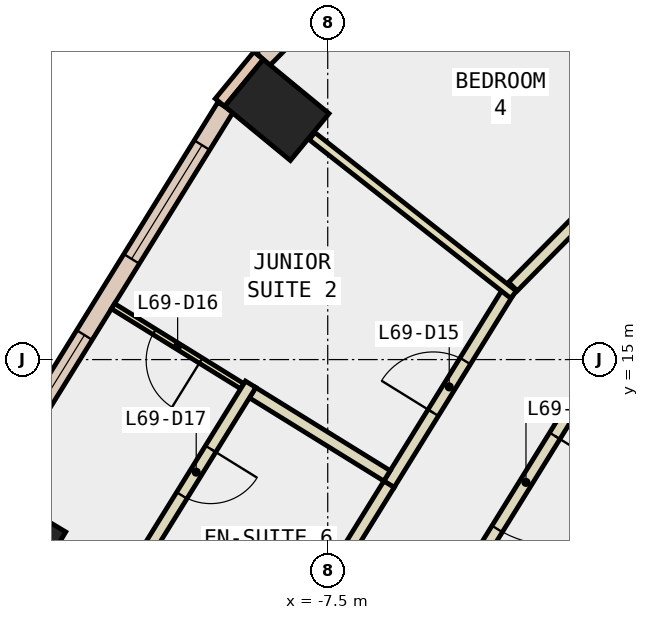
"""IFC4 building model, lengths in metres.
Left out: names, types, materials, properties, quantities, classifications, styles, units other than length and angle.
Written with IfcOpenShell. Run it as: python <this file> out.ifc"""

import sys

from ifc_helpers import new_model, si_unit, direction, frame, frame_2d, origin, origin_2d, place, context, subcontext, project, spatial, rectangle, extrude, element, fill, save


model = new_model("IFC4")
c1 = context("Model", 3, precision=1e-05, world=origin(), true_north=direction((0.0, 1.0)))
c2 = subcontext(c1, "Body", "Model", "MODEL_VIEW")
j1 = project(units=[si_unit("LENGTHUNIT", "METRE"), si_unit("PLANEANGLEUNIT", "RADIAN")], contexts=[c1])
p1 = place(None, origin())
s1 = spatial("IfcSite", under=j1, at=p1, CompositionType="ELEMENT")
p2 = place(p1, origin())
s2 = spatial("IfcBuilding", under=s1, at=p2, CompositionType="ELEMENT")
p3 = place(p2, frame((0.0, 0.0, 297.2)))
s3 = spatial("IfcBuildingStorey", under=s2, at=p3, CompositionType="ELEMENT", Elevation=297.2)
for number, where, z_axis, x_axis in (
    (1, (-8.337, 19.105, -0.34), (0.0, 0.0, 1.0), (0.636, 0.772, 0.0)),
    (2, (-12.666, 12.097, -0.34), (0.0, 0.0, 1.0), (0.514, 0.858, 0.0)),
):
    element("IfcColumn", number, at=place(p3, frame(where, z_axis=z_axis, x_axis=x_axis)), inside=s3, PredefinedType="COLUMN", context=c2, shape_type="SweptSolid", body=[
        extrude(rectangle(XDim=1.0, YDim=1.4, at=origin_2d()), origin(), (0.0, 0.0, 1.0), 3.6),
    ])
p4 = place(p3, frame((-8.637, 19.999, 0.0), z_axis=(0.0, 0.0, 1.0), x_axis=(-0.635852688617, -0.771810441999, 0.0)))
e3 = element("IfcWall", 3, at=p4, inside=s3, PredefinedType="STANDARD", context=c2, shape_type="SweptSolid", body=[
    extrude(rectangle(XDim=1.0, YDim=0.2, at=frame_2d((0.5, 0.0))), origin(), (0.0, 0.0, 1.0), 3.26),
])
p5 = place(p3, frame((-5.572, 22.969, 0.0), z_axis=(0.0, 0.0, 1.0), x_axis=(-0.70250598769, -0.711677832491, 0.0)))
e4 = element("IfcWall", 4, at=p5, inside=s3, PredefinedType="STANDARD", context=c2, shape_type="SweptSolid", body=[
    extrude(rectangle(XDim=4.259, YDim=0.3, at=frame_2d((2.129, 0.0))), origin(), (0.0, 0.0, 1.0), 3.26),
])
p6 = place(p5, frame((1.429, 0.0, 0.9)))
e5 = element("IfcOpeningElement", 5, at=p6, cuts=e4, PredefinedType="OPENING", context=c2, shape_type="SweptSolid", body=[
    extrude(rectangle(XDim=1.4, YDim=2.0, at=frame_2d((0.7, 1.0))), frame((0.0, 0.16, 0.0), z_axis=(0.0, -1.0, 0.0), x_axis=(1.0, 0.0, 0.0)), (0.0, 0.0, 1.0), 0.32),
])
p7 = place(p3, frame((-9.18, 19.153, 0.0), z_axis=(0.0, 0.0, 1.0), x_axis=(-0.526409529565, -0.850231149267, 0.0)))
e6 = element("IfcWall", 6, at=p7, inside=s3, PredefinedType="STANDARD", context=c2, shape_type="SweptSolid", body=[
    extrude(rectangle(XDim=7.346, YDim=0.3, at=frame_2d((3.673, 0.0))), origin(), (0.0, 0.0, 1.0), 3.26),
])
p8 = place(p7, frame((0.737, 0.0, 0.9)))
e7 = element("IfcOpeningElement", 7, at=p8, cuts=e6, PredefinedType="OPENING", context=c2, shape_type="SweptSolid", body=[
    extrude(rectangle(XDim=2.2, YDim=2.0, at=frame_2d((1.1, 1.0))), frame((0.0, 0.16, 0.0), z_axis=(0.0, -1.0, 0.0), x_axis=(1.0, 0.0, 0.0)), (0.0, 0.0, 1.0), 0.32),
])
p9 = place(p7, frame((4.41, 0.0, 0.9)))
e8 = element("IfcOpeningElement", 8, at=p9, cuts=e6, PredefinedType="OPENING", context=c2, shape_type="SweptSolid", body=[
    extrude(rectangle(XDim=2.2, YDim=2.0, at=frame_2d((1.1, 1.0))), frame((0.0, 0.16, 0.0), z_axis=(0.0, -1.0, 0.0), x_axis=(1.0, 0.0, 0.0)), (0.0, 0.0, 1.0), 0.32),
])
p10 = place(p3, frame((-2.969, 15.033, 0.0), z_axis=(0.0, 0.0, 1.0), x_axis=(-0.526330241425, -0.85028023437, 0.0)))
e9 = element("IfcWall", 9, at=p10, inside=s3, PredefinedType="PARTITIONING", context=c2, shape_type="SweptSolid", body=[
    extrude(rectangle(XDim=4.828, YDim=0.2, at=frame_2d((2.414, 0.0))), origin(), (0.0, 0.0, 1.0), 3.26),
])
p11 = place(p10, frame((1.514, 0.0, 0.0)))
e10 = element("IfcOpeningElement", 10, at=p11, cuts=e9, PredefinedType="OPENING", context=c2, shape_type="SweptSolid", body=[
    extrude(rectangle(XDim=1.8, YDim=2.1, at=frame_2d((0.9, 1.05))), frame((0.0, 0.11, 0.0), z_axis=(0.0, -1.0, 0.0), x_axis=(1.0, 0.0, 0.0)), (0.0, 0.0, 1.0), 0.22),
])
p12 = place(p3, frame((-4.454, 16.201, 0.0), z_axis=(0.0, 0.0, 1.0), x_axis=(0.702505657511, 0.711678158415, 0.0)))
e11 = element("IfcWall", 11, at=p12, inside=s3, PredefinedType="PARTITIONING", context=c2, shape_type="SweptSolid", body=[
    extrude(rectangle(XDim=3.167, YDim=0.2, at=frame_2d((1.584, 0.0))), origin(), (0.0, 0.0, 1.0), 3.26),
])
p13 = place(p3, frame((-6.493, 12.95, 0.0), z_axis=(0.0, 0.0, 1.0), x_axis=(0.526432748426, 0.850216773173, 0.0)))
e12 = element("IfcWall", 12, at=p13, inside=s3, PredefinedType="PARTITIONING", context=c2, shape_type="SweptSolid", body=[
    extrude(rectangle(XDim=3.765, YDim=0.2, at=frame_2d((1.882, 0.0))), origin(), (0.0, 0.0, 1.0), 3.26),
])
p14 = place(p13, frame((1.383, 0.0, 0.0)))
e13 = element("IfcOpeningElement", 13, at=p14, cuts=e12, PredefinedType="OPENING", context=c2, shape_type="SweptSolid", body=[
    extrude(rectangle(XDim=1.0, YDim=2.1, at=frame_2d((0.5, 1.05))), frame((0.0, 0.11, 0.0), z_axis=(0.0, -1.0, 0.0), x_axis=(1.0, 0.0, 0.0)), (0.0, 0.0, 1.0), 0.22),
])
p15 = place(p3, frame((-8.177, 10.229, 0.0), z_axis=(0.0, 0.0, 1.0), x_axis=(0.526504295939, 0.850172468595, 0.0)))
e14 = element("IfcWall", 14, at=p15, inside=s3, PredefinedType="PARTITIONING", context=c2, shape_type="SweptSolid", body=[
    extrude(rectangle(XDim=3.2, YDim=0.2, at=frame_2d((1.6, 0.0))), origin(), (0.0, 0.0, 1.0), 3.26),
])
p16 = place(p3, frame((-4.445, 16.068, 0.0), z_axis=(0.0, 0.0, 1.0), x_axis=(-0.785872006963, 0.618389188677, 0.0)))
e15 = element("IfcWall", 15, at=p16, inside=s3, PredefinedType="PARTITIONING", context=c2, shape_type="SweptSolid", body=[
    extrude(rectangle(XDim=4.216, YDim=0.15, at=frame_2d((2.108, 0.0))), origin(), (0.0, 0.0, 1.0), 3.26),
])
p17 = place(p3, frame((-8.906, 14.562, 0.0), z_axis=(0.0, 0.0, 1.0), x_axis=(-0.850186034224, 0.526482390219, 0.0)))
e16 = element("IfcWall", 16, at=p17, inside=s3, PredefinedType="PARTITIONING", context=c2, shape_type="SweptSolid", body=[
    extrude(rectangle(XDim=2.5, YDim=0.1, at=frame_2d((1.25, 0.0))), origin(), (0.0, 0.0, 1.0), 3.26),
])
p18 = place(p17, frame((0.8, 0.0, 0.0)))
e17 = element("IfcOpeningElement", 17, at=p18, cuts=e16, PredefinedType="OPENING", context=c2, shape_type="SweptSolid", body=[
    extrude(rectangle(XDim=0.9, YDim=2.1, at=frame_2d((0.45, 1.05))), frame((0.0, 0.06, 0.0), z_axis=(0.0, -1.0, 0.0), x_axis=(1.0, 0.0, 0.0)), (0.0, 0.0, 1.0), 0.12),
])
p19 = place(p3, frame((-6.525, 13.088, 0.0), z_axis=(0.0, 0.0, 1.0), x_axis=(-0.850379182329, 0.526170358592, 0.0)))
e18 = element("IfcWall", 18, at=p19, inside=s3, PredefinedType="PARTITIONING", context=c2, shape_type="SweptSolid", body=[
    extrude(rectangle(XDim=2.6, YDim=0.2, at=frame_2d((1.3, 0.0))), origin(), (0.0, 0.0, 1.0), 3.26),
])
p20 = place(p3, frame((-8.768, 14.594, 0.0), z_axis=(0.0, 0.0, 1.0), x_axis=(-0.526418877713, -0.850225361412, 0.0)))
e19 = element("IfcWall", 19, at=p20, inside=s3, PredefinedType="PARTITIONING", context=c2, shape_type="SweptSolid", body=[
    extrude(rectangle(XDim=3.4, YDim=0.2, at=frame_2d((1.7, 0.0))), origin(), (0.0, 0.0, 1.0), 3.26),
])
p21 = place(p20, frame((1.25, 0.0, 0.0)))
e20 = element("IfcOpeningElement", 20, at=p21, cuts=e19, PredefinedType="OPENING", context=c2, shape_type="SweptSolid", body=[
    extrude(rectangle(XDim=0.9, YDim=2.1, at=frame_2d((0.45, 1.05))), frame((0.0, 0.11, 0.0), z_axis=(0.0, -1.0, 0.0), x_axis=(1.0, 0.0, 0.0)), (0.0, 0.0, 1.0), 0.22),
])
p22 = place(p8, origin())
e21 = element("IfcWindow", 21, at=p22, inside=s3, PartitioningType="SINGLE_PANEL", PredefinedType="WINDOW", context=c2, shape_type="SweptSolid", body=[
    extrude(rectangle(XDim=2.2, YDim=2.0, at=frame_2d((1.1, 1.0))), frame((0.0, 0.03, 0.0), z_axis=(0.0, -1.0, 0.0), x_axis=(1.0, 0.0, 0.0)), (0.0, 0.0, 1.0), 0.06),
])
fill(e7, e21)
p23 = place(p9, origin())
e22 = element("IfcWindow", 22, at=p23, inside=s3, PartitioningType="SINGLE_PANEL", PredefinedType="WINDOW", context=c2, shape_type="SweptSolid", body=[
    extrude(rectangle(XDim=2.2, YDim=2.0, at=frame_2d((1.1, 1.0))), frame((0.0, 0.03, 0.0), z_axis=(0.0, -1.0, 0.0), x_axis=(1.0, 0.0, 0.0)), (0.0, 0.0, 1.0), 0.06),
])
fill(e8, e22)
p24 = place(p14, origin())
e23 = element("IfcDoor", 23, at=p24, inside=s3, OperationType="SINGLE_SWING_LEFT", PredefinedType="DOOR", context=c2, shape_type="SweptSolid", body=[
    extrude(rectangle(XDim=1.0, YDim=2.1, at=frame_2d((0.5, 1.05))), frame((0.0, 0.025, 0.0), z_axis=(0.0, -1.0, 0.0), x_axis=(1.0, 0.0, 0.0)), (0.0, 0.0, 1.0), 0.05),
])
fill(e13, e23)
p25 = place(p18, origin())
e24 = element("IfcDoor", 24, at=p25, inside=s3, OperationType="SINGLE_SWING_LEFT", PredefinedType="DOOR", context=c2, shape_type="SweptSolid", body=[
    extrude(rectangle(XDim=0.9, YDim=2.1, at=frame_2d((0.45, 1.05))), frame((0.0, 0.025, 0.0), z_axis=(0.0, -1.0, 0.0), x_axis=(1.0, 0.0, 0.0)), (0.0, 0.0, 1.0), 0.05),
])
fill(e17, e24)
p26 = place(p21, origin())
e25 = element("IfcDoor", 25, at=p26, inside=s3, OperationType="SINGLE_SWING_LEFT", PredefinedType="DOOR", context=c2, shape_type="SweptSolid", body=[
    extrude(rectangle(XDim=0.9, YDim=2.1, at=frame_2d((0.45, 1.05))), frame((0.0, 0.025, 0.0), z_axis=(0.0, -1.0, 0.0), x_axis=(1.0, 0.0, 0.0)), (0.0, 0.0, 1.0), 0.05),
])
fill(e20, e25)
p27 = place(p11, origin())
e26 = element("IfcDoor", 26, at=p27, inside=s3, OperationType="DOUBLE_DOOR_SINGLE_SWING", PredefinedType="DOOR", context=c2, shape_type="SweptSolid", body=[
    extrude(rectangle(XDim=1.8, YDim=2.1, at=frame_2d((0.9, 1.05))), frame((0.0, 0.025, 0.0), z_axis=(0.0, -1.0, 0.0), x_axis=(1.0, 0.0, 0.0)), (0.0, 0.0, 1.0), 0.05),
])
fill(e10, e26)
save(model, sys.argv[1])
